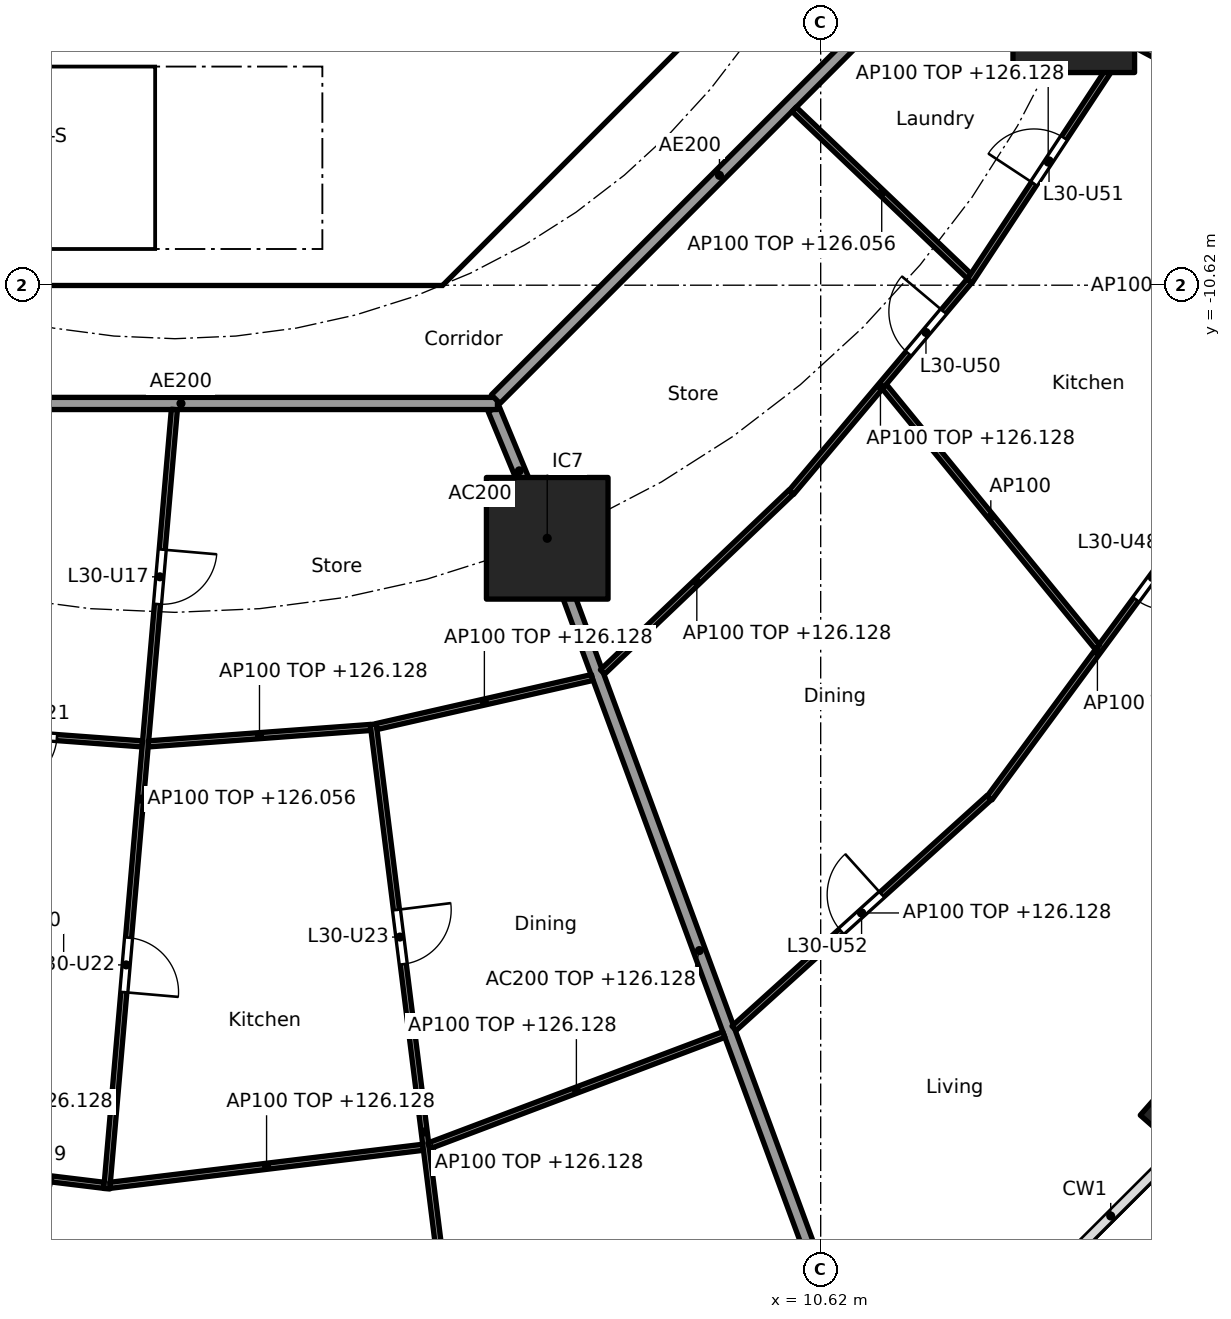
"""IFC4 building model, lengths in metres.
Left out: names, types, materials, properties, quantities, classifications, styles, units other than length and angle.
Written with IfcOpenShell. Run it as: python <this file> out.ifc"""

import sys

from ifc_helpers import new_model, si_unit, direction, frame, frame_2d, origin, origin_2d, place, context, subcontext, project, spatial, polyline, rectangle, hollow_rectangle, outline, extrude, element, fill, save


model = new_model("IFC4")
c1 = context("Model", 3, precision=1e-05, world=origin(), true_north=direction((0.0, 1.0)))
c2 = subcontext(c1, "Body", "Model", "MODEL_VIEW")
j1 = project(units=[si_unit("LENGTHUNIT", "METRE"), si_unit("PLANEANGLEUNIT", "RADIAN")], contexts=[c1])
p1 = place(None, origin())
s1 = spatial("IfcSite", under=j1, at=p1, CompositionType="ELEMENT")
p2 = place(p1, origin())
s2 = spatial("IfcBuilding", under=s1, at=p2, CompositionType="ELEMENT")
p3 = place(p2, frame((0.0, 0.0, 123.3)))
s3 = spatial("IfcBuildingStorey", under=s2, at=p3, CompositionType="ELEMENT", Elevation=123.3)
p4 = place(p3, frame((16.61, -24.115, 0.0), z_axis=(0.0, 0.0, 1.0), x_axis=(0.660114607735, 0.751164898445, 0.0)))
e1 = element("IfcColumn", 1, at=p4, inside=s3, PredefinedType="COLUMN", context=c2, shape_type="SweptSolid", body=[
    extrude(hollow_rectangle(XDim=1.2, YDim=0.9, WallThickness=0.04, at=origin_2d()), origin(), (0.0, 0.0, 1.0), 3.7),
])
for number, where, z_axis, x_axis in (
    (2, (6.123, -14.782, 0.0), (0.0, 0.0, 1.0), (1.0, 0.0, 0.0)),
    (3, (14.782, -6.123, 0.0), (0.0, 0.0, 1.0), (1.0, 0.0, 0.0)),
):
    element("IfcColumn", number, at=place(p3, frame(where, z_axis=z_axis, x_axis=x_axis)), inside=s3, PredefinedType="COLUMN", context=c2, shape_type="SweptSolid", body=[
        extrude(rectangle(XDim=2.0, YDim=2.0, at=origin_2d()), origin(), (0.0, 0.0, 1.0), 3.7),
    ])
p5 = place(p3, frame((4.613, -9.988, 0.0), z_axis=(0.0, 0.0, 1.0), x_axis=(0.707106781187, 0.707106781187, 0.0)))
e4 = element("IfcWall", 4, at=p5, inside=s3, PredefinedType="SHEAR", context=c2, shape_type="SweptSolid", body=[
    extrude(rectangle(XDim=7.602, YDim=0.6, at=frame_2d((3.801, 0.0))), origin(), (0.0, 0.0, 1.0), 3.44),
])
p6 = place(p5, frame((3.201, 0.0, 0.0)))
e5 = element("IfcOpeningElement", 5, at=p6, cuts=e4, PredefinedType="OPENING", context=c2, shape_type="SweptSolid", body=[
    extrude(rectangle(XDim=1.2, YDim=2.1, at=frame_2d((0.6, 1.05))), frame((0.0, 0.31, 0.0), z_axis=(0.0, -1.0, 0.0), x_axis=(1.0, 0.0, 0.0)), (0.0, 0.0, 1.0), 0.62),
])
p7 = place(p3, frame((4.0, -10.025, 0.0), z_axis=(0.0, 0.0, 1.0), x_axis=(0.0, 1.0, 0.0)))
e6 = element("IfcWall", 6, at=p7, inside=s3, PredefinedType="SOLIDWALL", context=c2, shape_type="SweptSolid", body=[
    extrude(rectangle(XDim=3.0, YDim=0.2, at=frame_2d((1.5, 0.0))), origin(), (0.0, 0.0, 1.0), 3.44),
])
p8 = place(p7, frame((0.975, 0.0, 0.0)))
e7 = element("IfcOpeningElement", 7, at=p8, cuts=e6, PredefinedType="OPENING", context=c2, shape_type="SweptSolid", body=[
    extrude(rectangle(XDim=1.1, YDim=2.1, at=frame_2d((0.55, 1.05))), frame((0.0, 0.11, 0.0), z_axis=(0.0, -1.0, 0.0), x_axis=(1.0, 0.0, 0.0)), (0.0, 0.0, 1.0), 0.22),
])
p9 = place(p3, origin())
e8 = element("IfcWall", 8, at=p9, inside=s3, PredefinedType="SHEAR", context=c2, shape_type="SweptSolid", body=[
    extrude(outline(polyline([(-4.152, -10.025), (4.152, -10.025), (4.401, -9.776), (4.825, -10.2), (4.401, -10.625), (-4.401, -10.625), (-4.825, -10.2), (-4.401, -9.776), (-4.152, -10.025)])), origin(), (0.0, 0.0, 1.0), 3.44),
])
p10 = place(p3, origin())
e9 = element("IfcWall", 9, at=p10, inside=s3, PredefinedType="SOLIDWALL", context=c2, shape_type="SweptSolid", body=[
    extrude(outline(polyline([(4.1, -7.025), (-4.1, -7.025), (-4.1, -6.5), (4.1, -6.5), (4.1, -7.025)])), origin(), (0.0, 0.0, 1.0), 3.44),
])
p11 = place(p3, frame((5.243, -12.657, 0.0), z_axis=(0.0, 0.0, 1.0), x_axis=(0.38273085373, -0.923859888513, 0.0)))
e10 = element("IfcWall", 10, at=p11, inside=s3, PredefinedType="PARTITIONING", context=c2, shape_type="SweptSolid", body=[
    extrude(rectangle(XDim=2.199, YDim=0.2, at=frame_2d((1.1, 0.0))), origin(), (0.0, 0.0, 1.0), 3.44),
])
p12 = place(p3, frame((6.14, -14.829, 0.0), z_axis=(0.0, 0.0, 1.0), x_axis=(0.346169582481, -0.938171956608, 0.0)))
e11 = element("IfcWall", 11, at=p12, inside=s3, PredefinedType="PARTITIONING", context=c2, shape_type="SweptSolid", body=[
    extrude(rectangle(XDim=14.354, YDim=0.2, at=frame_2d((7.177, 0.0))), origin(), (0.0, 0.0, 1.0), 2.828),
])
p13 = place(p3, frame((-5.104, -12.565, 0.0), z_axis=(0.0, 0.0, 1.0), x_axis=(1.0, 0.0, 0.0)))
e12 = element("IfcWall", 12, at=p13, inside=s3, PredefinedType="PARTITIONING", context=c2, shape_type="SweptSolid", body=[
    extrude(rectangle(XDim=10.409, YDim=0.2, at=frame_2d((5.205, 0.0))), origin(), (0.0, 0.0, 1.0), 3.44),
])
p14 = place(p3, frame((5.275, -12.494, 0.0), z_axis=(0.0, 0.0, 1.0), x_axis=(0.707106781187, 0.707106781187, 0.0)))
e13 = element("IfcWall", 13, at=p14, inside=s3, PredefinedType="PARTITIONING", context=c2, shape_type="SweptSolid", body=[
    extrude(rectangle(XDim=10.409, YDim=0.2, at=frame_2d((5.205, 0.0))), origin(), (0.0, 0.0, 1.0), 3.44),
])
p15 = place(p3, frame((-4.29, -17.885, 0.0), z_axis=(0.0, 0.0, 1.0), x_axis=(0.997272353708, -0.073809569363, 0.0)))
e14 = element("IfcWall", 14, at=p15, inside=s3, PredefinedType="PARTITIONING", context=c2, shape_type="SweptSolid", body=[
    extrude(rectangle(XDim=3.764, YDim=0.1, at=frame_2d((1.882, 0.0))), origin(), (0.0, 0.0, 1.0), 2.828),
])
p16 = place(p15, frame((1.457, 0.0, 0.0)))
e15 = element("IfcOpeningElement", 15, at=p16, cuts=e14, PredefinedType="OPENING", context=c2, shape_type="SweptSolid", body=[
    extrude(rectangle(XDim=0.9, YDim=2.1, at=frame_2d((0.45, 1.05))), frame((0.0, 0.06, 0.0), z_axis=(0.0, -1.0, 0.0), x_axis=(1.0, 0.0, 0.0)), (0.0, 0.0, 1.0), 0.12),
])
p17 = place(p3, frame((-6.413, -24.784, 0.0), z_axis=(0.0, 0.0, 1.0), x_axis=(0.992690077723, -0.120691381588, 0.0)))
e16 = element("IfcWall", 16, at=p17, inside=s3, PredefinedType="PARTITIONING", context=c2, shape_type="SweptSolid", body=[
    extrude(rectangle(XDim=5.286, YDim=0.1, at=frame_2d((2.643, 0.0))), origin(), (0.0, 0.0, 1.0), 2.828),
])
p18 = place(p17, frame((3.539, 0.0, 0.0)))
e17 = element("IfcOpeningElement", 17, at=p18, cuts=e16, PredefinedType="OPENING", context=c2, shape_type="SweptSolid", body=[
    extrude(rectangle(XDim=0.9, YDim=2.1, at=frame_2d((0.45, 1.05))), frame((0.0, 0.06, 0.0), z_axis=(0.0, -1.0, 0.0), x_axis=(1.0, 0.0, 0.0)), (0.0, 0.0, 1.0), 0.12),
])
p19 = place(p3, frame((-0.009, -12.664, 0.0), z_axis=(0.0, 0.0, 1.0), x_axis=(-0.086441225464, -0.996256952066, 0.0)))
e18 = element("IfcWall", 18, at=p19, inside=s3, PredefinedType="PARTITIONING", context=c2, shape_type="SweptSolid", body=[
    extrude(rectangle(XDim=12.862, YDim=0.1, at=frame_2d((6.431, 0.0))), origin(), (0.0, 0.0, 1.0), 2.756),
])
p20 = place(p19, frame((2.312, 0.0, 0.0)))
e19 = element("IfcOpeningElement", 19, at=p20, cuts=e18, PredefinedType="OPENING", context=c2, shape_type="SweptSolid", body=[
    extrude(rectangle(XDim=0.9, YDim=2.1, at=frame_2d((0.45, 1.05))), frame((0.0, 0.06, 0.0), z_axis=(0.0, -1.0, 0.0), x_axis=(1.0, 0.0, 0.0)), (0.0, 0.0, 1.0), 0.12),
])
p21 = place(p19, frame((8.718, 0.0, 0.0)))
e20 = element("IfcOpeningElement", 20, at=p21, cuts=e18, PredefinedType="OPENING", context=c2, shape_type="SweptSolid", body=[
    extrude(rectangle(XDim=0.9, YDim=2.1, at=frame_2d((0.45, 1.05))), frame((0.0, 0.06, 0.0), z_axis=(0.0, -1.0, 0.0), x_axis=(1.0, 0.0, 0.0)), (0.0, 0.0, 1.0), 0.12),
])
p22 = place(p3, frame((-0.436, -18.163, 0.0), z_axis=(0.0, 0.0, 1.0), x_axis=(0.997271025958, 0.073827506966, 0.0)))
e21 = element("IfcWall", 21, at=p22, inside=s3, PredefinedType="PARTITIONING", context=c2, shape_type="SweptSolid", body=[
    extrude(rectangle(XDim=3.664, YDim=0.1, at=frame_2d((1.832, 0.0))), origin(), (0.0, 0.0, 1.0), 2.828),
])
p23 = place(p3, frame((-1.066, -25.422, 0.0), z_axis=(0.0, 0.0, 1.0), x_axis=(0.992692993044, 0.120667400577, 0.0)))
e22 = element("IfcWall", 22, at=p23, inside=s3, PredefinedType="PARTITIONING", context=c2, shape_type="SweptSolid", body=[
    extrude(rectangle(XDim=5.186, YDim=0.1, at=frame_2d((2.593, 0.0))), origin(), (0.0, 0.0, 1.0), 2.828),
])
p24 = place(p3, frame((3.262, -17.839, 0.0), z_axis=(0.0, 0.0, 1.0), x_axis=(0.124074750982, -0.992272873845, 0.0)))
e23 = element("IfcWall", 23, at=p24, inside=s3, PredefinedType="PARTITIONING", context=c2, shape_type="SweptSolid", body=[
    extrude(rectangle(XDim=13.516, YDim=0.1, at=frame_2d((6.758, 0.0))), origin(), (0.0, 0.0, 1.0), 2.828),
])
p25 = place(p24, frame((3.078, 0.0, 0.0)))
e24 = element("IfcOpeningElement", 24, at=p25, cuts=e23, PredefinedType="OPENING", context=c2, shape_type="SweptSolid", body=[
    extrude(rectangle(XDim=0.9, YDim=2.1, at=frame_2d((0.45, 1.05))), frame((0.0, 0.06, 0.0), z_axis=(0.0, -1.0, 0.0), x_axis=(1.0, 0.0, 0.0)), (0.0, 0.0, 1.0), 0.12),
])
p26 = place(p24, frame((9.811, 0.0, 0.0)))
e25 = element("IfcOpeningElement", 25, at=p26, cuts=e23, PredefinedType="OPENING", context=c2, shape_type="SweptSolid", body=[
    extrude(rectangle(XDim=0.9, YDim=2.1, at=frame_2d((0.45, 1.05))), frame((0.0, 0.06, 0.0), z_axis=(0.0, -1.0, 0.0), x_axis=(1.0, 0.0, 0.0)), (0.0, 0.0, 1.0), 0.12),
])
p27 = place(p3, frame((3.317, -17.878, 0.0), z_axis=(0.0, 0.0, 1.0), x_axis=(0.975095905288, 0.221783623135, 0.0)))
e26 = element("IfcWall", 26, at=p27, inside=s3, PredefinedType="PARTITIONING", context=c2, shape_type="SweptSolid", body=[
    extrude(rectangle(XDim=3.636, YDim=0.1, at=frame_2d((1.818, 0.0))), origin(), (0.0, 0.0, 1.0), 2.828),
])
p28 = place(p3, frame((4.178, -24.773, 0.0), z_axis=(0.0, 0.0, 1.0), x_axis=(0.935583811437, 0.353104703702, 0.0)))
e27 = element("IfcWall", 27, at=p28, inside=s3, PredefinedType="PARTITIONING", context=c2, shape_type="SweptSolid", body=[
    extrude(rectangle(XDim=5.184, YDim=0.1, at=frame_2d((2.592, 0.0))), origin(), (0.0, 0.0, 1.0), 2.828),
])
p29 = place(p3, frame((7.032, -16.98, 0.0), z_axis=(0.0, 0.0, 1.0), x_axis=(0.723709759148, 0.690104473622, 0.0)))
e28 = element("IfcWall", 28, at=p29, inside=s3, PredefinedType="PARTITIONING", context=c2, shape_type="SweptSolid", body=[
    extrude(rectangle(XDim=4.286, YDim=0.1, at=frame_2d((2.143, 0.0))), origin(), (0.0, 0.0, 1.0), 2.828),
])
p30 = place(p3, frame((9.195, -22.84, 0.0), z_axis=(0.0, 0.0, 1.0), x_axis=(0.741675855479, 0.670758470241, 0.0)))
e29 = element("IfcWall", 29, at=p30, inside=s3, PredefinedType="PARTITIONING", context=c2, shape_type="SweptSolid", body=[
    extrude(rectangle(XDim=5.656, YDim=0.1, at=frame_2d((2.828, 0.0))), origin(), (0.0, 0.0, 1.0), 2.828),
])
p31 = place(p30, frame((2.378, 0.0, 0.0)))
e30 = element("IfcOpeningElement", 30, at=p31, cuts=e29, PredefinedType="OPENING", context=c2, shape_type="SweptSolid", body=[
    extrude(rectangle(XDim=0.9, YDim=2.1, at=frame_2d((0.45, 1.05))), frame((0.0, 0.06, 0.0), z_axis=(0.0, -1.0, 0.0), x_axis=(1.0, 0.0, 0.0)), (0.0, 0.0, 1.0), 0.12),
])
p32 = place(p3, frame((10.138, -14.026, 0.0), z_axis=(0.0, 0.0, 1.0), x_axis=(0.644051444483, 0.764982180746, 0.0)))
e31 = element("IfcWall", 31, at=p32, inside=s3, PredefinedType="PARTITIONING", context=c2, shape_type="SweptSolid", body=[
    extrude(rectangle(XDim=4.548, YDim=0.1, at=frame_2d((2.274, 0.0))), origin(), (0.0, 0.0, 1.0), 2.828),
])
p33 = place(p32, frame((2.986, 0.0, 0.0)))
e32 = element("IfcOpeningElement", 32, at=p33, cuts=e31, PredefinedType="OPENING", context=c2, shape_type="SweptSolid", body=[
    extrude(rectangle(XDim=0.9, YDim=2.1, at=frame_2d((0.45, 1.05))), frame((0.0, 0.06, 0.0), z_axis=(0.0, -1.0, 0.0), x_axis=(1.0, 0.0, 0.0)), (0.0, 0.0, 1.0), 0.12),
])
p34 = place(p3, frame((13.397, -19.053, 0.0), z_axis=(0.0, 0.0, 1.0), x_axis=(0.593522299069, 0.804817544856, 0.0)))
e33 = element("IfcWall", 33, at=p34, inside=s3, PredefinedType="PARTITIONING", context=c2, shape_type="SweptSolid", body=[
    extrude(rectangle(XDim=5.976, YDim=0.1, at=frame_2d((2.988, 0.0))), origin(), (0.0, 0.0, 1.0), 2.828),
])
p35 = place(p34, frame((4.057, 0.0, 0.0)))
e34 = element("IfcOpeningElement", 34, at=p35, cuts=e33, PredefinedType="OPENING", context=c2, shape_type="SweptSolid", body=[
    extrude(rectangle(XDim=0.9, YDim=2.1, at=frame_2d((0.45, 1.05))), frame((0.0, 0.06, 0.0), z_axis=(0.0, -1.0, 0.0), x_axis=(1.0, 0.0, 0.0)), (0.0, 0.0, 1.0), 0.12),
])
p36 = place(p3, frame((11.667, -12.287, 0.0), z_axis=(0.0, 0.0, 1.0), x_axis=(0.633038312428, -0.774120465431, 0.0)))
e35 = element("IfcWall", 35, at=p36, inside=s3, PredefinedType="PARTITIONING", context=c2, shape_type="SweptSolid", body=[
    extrude(rectangle(XDim=5.532, YDim=0.1, at=frame_2d((2.766, 0.0))), origin(), (0.0, 0.0, 1.0), 3.44),
])
p37 = place(p3, frame((10.184, -7.727, 0.0), z_axis=(0.0, 0.0, 1.0), x_axis=(0.723654892782, -0.690162007179, 0.0)))
e36 = element("IfcWall", 36, at=p37, inside=s3, PredefinedType="PARTITIONING", context=c2, shape_type="SweptSolid", body=[
    extrude(rectangle(XDim=3.98, YDim=0.1, at=frame_2d((1.99, 0.0))), origin(), (0.0, 0.0, 1.0), 2.756),
])
p38 = place(p3, frame((13.072, -10.55, 0.0), z_axis=(0.0, 0.0, 1.0), x_axis=(0.550614843759, 0.834759422727, 0.0)))
e37 = element("IfcWall", 37, at=p38, inside=s3, PredefinedType="PARTITIONING", context=c2, shape_type="SweptSolid", body=[
    extrude(rectangle(XDim=4.683, YDim=0.1, at=frame_2d((2.341, 0.0))), origin(), (0.0, 0.0, 1.0), 2.828),
])
p39 = place(p38, frame((1.917, 0.0, 0.0)))
e38 = element("IfcOpeningElement", 38, at=p39, cuts=e37, PredefinedType="OPENING", context=c2, shape_type="SweptSolid", body=[
    extrude(rectangle(XDim=0.9, YDim=2.1, at=frame_2d((0.45, 1.05))), frame((0.0, 0.06, 0.0), z_axis=(0.0, -1.0, 0.0), x_axis=(1.0, 0.0, 0.0)), (0.0, 0.0, 1.0), 0.12),
])
p40 = place(p3, frame((14.826, -6.146, 0.0), z_axis=(0.0, 0.0, 1.0), x_axis=(0.883012998471, -0.469348532044, 0.0)))
e39 = element("IfcWall", 39, at=p40, inside=s3, PredefinedType="PARTITIONING", context=c2, shape_type="SweptSolid", body=[
    extrude(rectangle(XDim=9.172, YDim=0.1, at=frame_2d((4.586, 0.0))), origin(), (0.0, 0.0, 1.0), 2.828),
])
p41 = place(p40, frame((2.728, 0.0, 0.0)))
e40 = element("IfcOpeningElement", 40, at=p41, cuts=e39, PredefinedType="OPENING", context=c2, shape_type="SweptSolid", body=[
    extrude(rectangle(XDim=0.9, YDim=2.1, at=frame_2d((0.45, 1.05))), frame((0.0, 0.06, 0.0), z_axis=(0.0, -1.0, 0.0), x_axis=(1.0, 0.0, 0.0)), (0.0, 0.0, 1.0), 0.12),
])
p42 = place(p8, origin())
e41 = element("IfcDoor", 41, at=p42, inside=s3, OperationType="SINGLE_SWING_LEFT", PredefinedType="DOOR", context=c2, shape_type="SweptSolid", body=[
    extrude(rectangle(XDim=1.1, YDim=2.1, at=frame_2d((0.55, 1.05))), frame((0.0, 0.025, 0.0), z_axis=(0.0, -1.0, 0.0), x_axis=(1.0, 0.0, 0.0)), (0.0, 0.0, 1.0), 0.05),
])
fill(e7, e41)
p43 = place(p6, origin())
e42 = element("IfcDoor", 42, at=p43, inside=s3, OperationType="SINGLE_SWING_RIGHT", PredefinedType="DOOR", context=c2, shape_type="SweptSolid", body=[
    extrude(rectangle(XDim=1.2, YDim=2.1, at=frame_2d((0.6, 1.05))), frame((0.0, 0.025, 0.0), z_axis=(0.0, -1.0, 0.0), x_axis=(1.0, 0.0, 0.0)), (0.0, 0.0, 1.0), 0.05),
])
fill(e5, e42)
p44 = place(p20, origin())
e43 = element("IfcDoor", 43, at=p44, inside=s3, OperationType="SINGLE_SWING_LEFT", PredefinedType="DOOR", context=c2, shape_type="SweptSolid", body=[
    extrude(rectangle(XDim=0.9, YDim=2.1, at=frame_2d((0.45, 1.05))), frame((0.0, 0.025, 0.0), z_axis=(0.0, -1.0, 0.0), x_axis=(1.0, 0.0, 0.0)), (0.0, 0.0, 1.0), 0.05),
])
fill(e19, e43)
p45 = place(p16, frame((0.9, 0.0, 0.0), x_axis=(-1.0, 0.0, 0.0)))
e44 = element("IfcDoor", 44, at=p45, inside=s3, OperationType="SINGLE_SWING_RIGHT", PredefinedType="DOOR", context=c2, shape_type="SweptSolid", body=[
    extrude(rectangle(XDim=0.9, YDim=2.1, at=frame_2d((0.45, 1.05))), frame((0.0, 0.025, 0.0), z_axis=(0.0, -1.0, 0.0), x_axis=(1.0, 0.0, 0.0)), (0.0, 0.0, 1.0), 0.05),
])
fill(e15, e44)
p46 = place(p21, origin())
e45 = element("IfcDoor", 45, at=p46, inside=s3, OperationType="SINGLE_SWING_RIGHT", PredefinedType="DOOR", context=c2, shape_type="SweptSolid", body=[
    extrude(rectangle(XDim=0.9, YDim=2.1, at=frame_2d((0.45, 1.05))), frame((0.0, 0.025, 0.0), z_axis=(0.0, -1.0, 0.0), x_axis=(1.0, 0.0, 0.0)), (0.0, 0.0, 1.0), 0.05),
])
fill(e20, e45)
p47 = place(p25, origin())
e46 = element("IfcDoor", 46, at=p47, inside=s3, OperationType="SINGLE_SWING_LEFT", PredefinedType="DOOR", context=c2, shape_type="SweptSolid", body=[
    extrude(rectangle(XDim=0.9, YDim=2.1, at=frame_2d((0.45, 1.05))), frame((0.0, 0.025, 0.0), z_axis=(0.0, -1.0, 0.0), x_axis=(1.0, 0.0, 0.0)), (0.0, 0.0, 1.0), 0.05),
])
fill(e24, e46)
p48 = place(p18, frame((0.9, 0.0, 0.0), x_axis=(-1.0, 0.0, 0.0)))
e47 = element("IfcDoor", 47, at=p48, inside=s3, OperationType="SINGLE_SWING_RIGHT", PredefinedType="DOOR", context=c2, shape_type="SweptSolid", body=[
    extrude(rectangle(XDim=0.9, YDim=2.1, at=frame_2d((0.45, 1.05))), frame((0.0, 0.025, 0.0), z_axis=(0.0, -1.0, 0.0), x_axis=(1.0, 0.0, 0.0)), (0.0, 0.0, 1.0), 0.05),
])
fill(e17, e47)
p49 = place(p35, frame((0.9, 0.0, 0.0), x_axis=(-1.0, 0.0, 0.0)))
e48 = element("IfcDoor", 48, at=p49, inside=s3, OperationType="SINGLE_SWING_LEFT", PredefinedType="DOOR", context=c2, shape_type="SweptSolid", body=[
    extrude(rectangle(XDim=0.9, YDim=2.1, at=frame_2d((0.45, 1.05))), frame((0.0, 0.025, 0.0), z_axis=(0.0, -1.0, 0.0), x_axis=(1.0, 0.0, 0.0)), (0.0, 0.0, 1.0), 0.05),
])
fill(e34, e48)
p50 = place(p33, origin())
e49 = element("IfcDoor", 49, at=p50, inside=s3, OperationType="SINGLE_SWING_RIGHT", PredefinedType="DOOR", context=c2, shape_type="SweptSolid", body=[
    extrude(rectangle(XDim=0.9, YDim=2.1, at=frame_2d((0.45, 1.05))), frame((0.0, 0.025, 0.0), z_axis=(0.0, -1.0, 0.0), x_axis=(1.0, 0.0, 0.0)), (0.0, 0.0, 1.0), 0.05),
])
fill(e32, e49)
p51 = place(p39, origin())
e50 = element("IfcDoor", 50, at=p51, inside=s3, OperationType="SINGLE_SWING_LEFT", PredefinedType="DOOR", context=c2, shape_type="SweptSolid", body=[
    extrude(rectangle(XDim=0.9, YDim=2.1, at=frame_2d((0.45, 1.05))), frame((0.0, 0.025, 0.0), z_axis=(0.0, -1.0, 0.0), x_axis=(1.0, 0.0, 0.0)), (0.0, 0.0, 1.0), 0.05),
])
fill(e38, e50)
p52 = place(p31, origin())
e51 = element("IfcDoor", 51, at=p52, inside=s3, OperationType="SINGLE_SWING_RIGHT", PredefinedType="DOOR", context=c2, shape_type="SweptSolid", body=[
    extrude(rectangle(XDim=0.9, YDim=2.1, at=frame_2d((0.45, 1.05))), frame((0.0, 0.025, 0.0), z_axis=(0.0, -1.0, 0.0), x_axis=(1.0, 0.0, 0.0)), (0.0, 0.0, 1.0), 0.05),
])
fill(e30, e51)
save(model, sys.argv[1])
